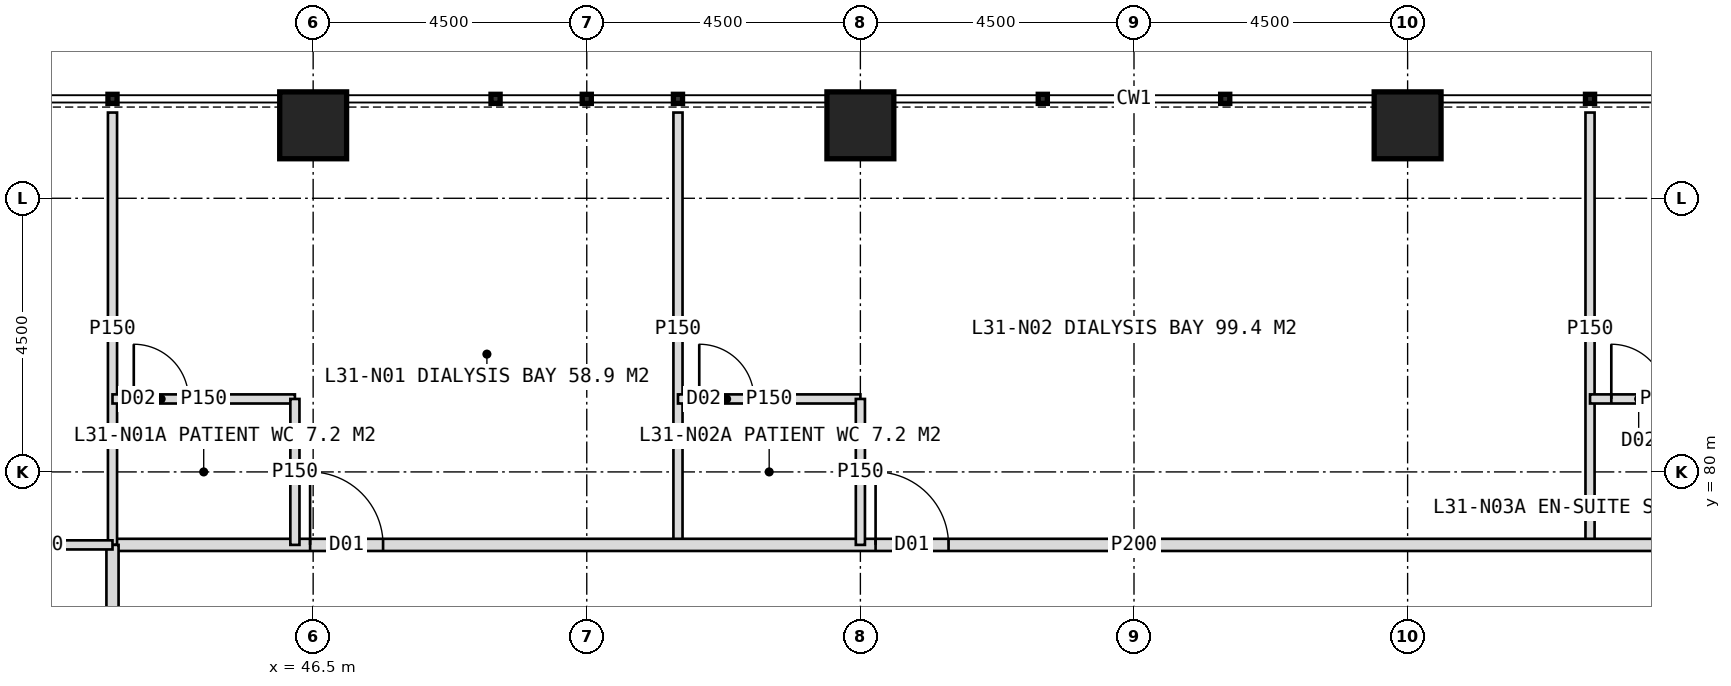
"""IFC4 building model, lengths in metres.
Left out: names, types, materials, properties, quantities, classifications, styles, units other than length and angle.
Written with IfcOpenShell. Run it as: python <this file> out.ifc"""

import sys

from ifc_helpers import new_model, si_unit, direction, frame, frame_2d, origin, origin_2d, place, context, subcontext, project, spatial, rectangle, hollow_rectangle, extrude, element, fill, save


model = new_model("IFC4")
c1 = context("Model", 3, precision=1e-05, world=origin(), true_north=direction((0.0, 1.0)))
c2 = subcontext(c1, "Body", "Model", "MODEL_VIEW")
j1 = project(units=[si_unit("LENGTHUNIT", "METRE"), si_unit("PLANEANGLEUNIT", "RADIAN")], contexts=[c1])
p1 = place(None, origin())
s1 = spatial("IfcSite", under=j1, at=p1, CompositionType="ELEMENT")
p2 = place(p1, origin())
s2 = spatial("IfcBuilding", under=s1, at=p2, CompositionType="ELEMENT")
p3 = place(p2, frame((0.0, 0.0, 132.0)))
s3 = spatial("IfcBuildingStorey", under=s2, at=p3, CompositionType="ELEMENT", Elevation=132.0)
for number, where, z_axis, x_axis in (
    (1, (46.5, 85.7, 0.0), (0.0, 0.0, 1.0), (1.0, 0.0, 0.0)),
    (2, (55.5, 85.7, 0.0), (0.0, 0.0, 1.0), (1.0, 0.0, 0.0)),
    (3, (64.5, 85.7, 0.0), (0.0, 0.0, 1.0), (1.0, 0.0, 0.0)),
):
    element("IfcColumn", number, at=place(p3, frame(where, z_axis=z_axis, x_axis=x_axis)), inside=s3, PredefinedType="COLUMN", context=c2, shape_type="SweptSolid", body=[
        extrude(hollow_rectangle(XDim=1.1, YDim=1.1, WallThickness=0.1, at=origin_2d()), origin(), (0.0, 0.0, 1.0), 4.0),
    ])
for number, where, z_axis, x_axis in (
    (4, (52.5, 78.8, 0.0), (0.0, 0.0, 1.0), (0.0, 1.0, 0.0)),
    (5, (67.5, 78.8, 0.0), (0.0, 0.0, 1.0), (0.0, 1.0, 0.0)),
):
    element("IfcWall", number, at=place(p3, frame(where, z_axis=z_axis, x_axis=x_axis)), inside=s3, PredefinedType="PARTITIONING", context=c2, shape_type="SweptSolid", body=[
        extrude(rectangle(XDim=7.11, YDim=0.15, at=frame_2d((3.555, 0.0))), origin(), (0.0, 0.0, 1.0), 3.75),
    ])
p4 = place(p3, frame((43.2, 78.8, 0.0), z_axis=(0.0, 0.0, 1.0), x_axis=(1.0, 0.0, 0.0)))
e6 = element("IfcWall", 6, at=p4, inside=s3, PredefinedType="PARTITIONING", context=c2, shape_type="SweptSolid", body=[
    extrude(rectangle(XDim=33.6, YDim=0.2, at=frame_2d((16.8, 0.0))), origin(), (0.0, 0.0, 1.0), 3.75),
])
p5 = place(p4, frame((3.25, 0.0, 0.0)))
e7 = element("IfcOpeningElement", 7, at=p5, cuts=e6, PredefinedType="OPENING", context=c2, shape_type="SweptSolid", body=[
    extrude(rectangle(XDim=1.2, YDim=2.2, at=frame_2d((0.6, 1.1))), frame((0.0, 0.11, 0.0), z_axis=(0.0, -1.0, 0.0), x_axis=(1.0, 0.0, 0.0)), (0.0, 0.0, 1.0), 0.22),
])
p6 = place(p4, frame((12.55, 0.0, 0.0)))
e8 = element("IfcOpeningElement", 8, at=p6, cuts=e6, PredefinedType="OPENING", context=c2, shape_type="SweptSolid", body=[
    extrude(rectangle(XDim=1.2, YDim=2.2, at=frame_2d((0.6, 1.1))), frame((0.0, 0.11, 0.0), z_axis=(0.0, -1.0, 0.0), x_axis=(1.0, 0.0, 0.0)), (0.0, 0.0, 1.0), 0.22),
])
p7 = place(p4, frame((26.95, 0.0, 0.0)))
e9 = element("IfcOpeningElement", 9, at=p7, cuts=e6, PredefinedType="OPENING", context=c2, shape_type="SweptSolid", body=[
    extrude(rectangle(XDim=1.2, YDim=2.2, at=frame_2d((0.6, 1.1))), frame((0.0, 0.11, 0.0), z_axis=(0.0, -1.0, 0.0), x_axis=(1.0, 0.0, 0.0)), (0.0, 0.0, 1.0), 0.22),
])
p8 = place(p3, frame((43.2, 78.8, 0.0), z_axis=(0.0, 0.0, 1.0), x_axis=(0.0, 1.0, 0.0)))
e10 = element("IfcWall", 10, at=p8, inside=s3, PredefinedType="PARTITIONING", context=c2, shape_type="SweptSolid", body=[
    extrude(rectangle(XDim=7.11, YDim=0.15, at=frame_2d((3.555, 0.0))), origin(), (0.0, 0.0, 1.0), 3.75),
])
p9 = place(p3, frame((43.2, 81.2, 0.0), z_axis=(0.0, 0.0, 1.0), x_axis=(1.0, 0.0, 0.0)))
e11 = element("IfcWall", 11, at=p9, inside=s3, PredefinedType="PARTITIONING", context=c2, shape_type="SweptSolid", body=[
    extrude(rectangle(XDim=3.0, YDim=0.15, at=frame_2d((1.5, 0.0))), origin(), (0.0, 0.0, 1.0), 2.997),
])
p10 = place(p9, frame((0.35, 0.0, 0.0)))
e12 = element("IfcOpeningElement", 12, at=p10, cuts=e11, PredefinedType="OPENING", context=c2, shape_type="SweptSolid", body=[
    extrude(rectangle(XDim=0.9, YDim=2.1, at=frame_2d((0.45, 1.05))), frame((0.0, 0.085, 0.0), z_axis=(0.0, -1.0, 0.0), x_axis=(1.0, 0.0, 0.0)), (0.0, 0.0, 1.0), 0.17),
])
p11 = place(p3, frame((46.2, 78.8, 0.0), z_axis=(0.0, 0.0, 1.0), x_axis=(0.0, 1.0, 0.0)))
e13 = element("IfcWall", 13, at=p11, inside=s3, PredefinedType="PARTITIONING", context=c2, shape_type="SweptSolid", body=[
    extrude(rectangle(XDim=2.4, YDim=0.15, at=frame_2d((1.2, 0.0))), origin(), (0.0, 0.0, 1.0), 3.75),
])
p12 = place(p3, frame((52.5, 81.2, 0.0), z_axis=(0.0, 0.0, 1.0), x_axis=(1.0, 0.0, 0.0)))
e14 = element("IfcWall", 14, at=p12, inside=s3, PredefinedType="PARTITIONING", context=c2, shape_type="SweptSolid", body=[
    extrude(rectangle(XDim=3.0, YDim=0.15, at=frame_2d((1.5, 0.0))), origin(), (0.0, 0.0, 1.0), 3.75),
])
p13 = place(p12, frame((0.35, 0.0, 0.0)))
e15 = element("IfcOpeningElement", 15, at=p13, cuts=e14, PredefinedType="OPENING", context=c2, shape_type="SweptSolid", body=[
    extrude(rectangle(XDim=0.9, YDim=2.1, at=frame_2d((0.45, 1.05))), frame((0.0, 0.085, 0.0), z_axis=(0.0, -1.0, 0.0), x_axis=(1.0, 0.0, 0.0)), (0.0, 0.0, 1.0), 0.17),
])
p14 = place(p3, frame((55.5, 78.8, 0.0), z_axis=(0.0, 0.0, 1.0), x_axis=(0.0, 1.0, 0.0)))
e16 = element("IfcWall", 16, at=p14, inside=s3, PredefinedType="PARTITIONING", context=c2, shape_type="SweptSolid", body=[
    extrude(rectangle(XDim=2.4, YDim=0.15, at=frame_2d((1.2, 0.0))), origin(), (0.0, 0.0, 1.0), 2.95),
])
p15 = place(p3, frame((67.5, 81.2, 0.0), z_axis=(0.0, 0.0, 1.0), x_axis=(1.0, 0.0, 0.0)))
e17 = element("IfcWall", 17, at=p15, inside=s3, PredefinedType="PARTITIONING", context=c2, shape_type="SweptSolid", body=[
    extrude(rectangle(XDim=2.4, YDim=0.15, at=frame_2d((1.2, 0.0))), origin(), (0.0, 0.0, 1.0), 3.75),
])
p16 = place(p15, frame((0.35, 0.0, 0.0)))
e18 = element("IfcOpeningElement", 18, at=p16, cuts=e17, PredefinedType="OPENING", context=c2, shape_type="SweptSolid", body=[
    extrude(rectangle(XDim=0.9, YDim=2.1, at=frame_2d((0.45, 1.05))), frame((0.0, 0.085, 0.0), z_axis=(0.0, -1.0, 0.0), x_axis=(1.0, 0.0, 0.0)), (0.0, 0.0, 1.0), 0.17),
])
p17 = place(p3, frame((43.2, 45.2, 0.0), z_axis=(0.0, 0.0, 1.0), x_axis=(0.0, 1.0, 0.0)))
e19 = element("IfcWall", 19, at=p17, inside=s3, PredefinedType="PARTITIONING", context=c2, shape_type="SweptSolid", body=[
    extrude(rectangle(XDim=33.6, YDim=0.2, at=frame_2d((16.8, 0.0))), origin(), (0.0, 0.0, 1.0), 3.75),
])
p18 = place(p17, frame((2.65, 0.0, 0.0)))
e20 = element("IfcOpeningElement", 20, at=p18, cuts=e19, PredefinedType="OPENING", context=c2, shape_type="SweptSolid", body=[
    extrude(rectangle(XDim=1.2, YDim=2.2, at=frame_2d((0.6, 1.1))), frame((0.0, 0.11, 0.0), z_axis=(0.0, -1.0, 0.0), x_axis=(1.0, 0.0, 0.0)), (0.0, 0.0, 1.0), 0.22),
])
p19 = place(p17, frame((8.95, 0.0, 0.0)))
e21 = element("IfcOpeningElement", 21, at=p19, cuts=e19, PredefinedType="OPENING", context=c2, shape_type="SweptSolid", body=[
    extrude(rectangle(XDim=1.2, YDim=2.2, at=frame_2d((0.6, 1.1))), frame((0.0, 0.11, 0.0), z_axis=(0.0, -1.0, 0.0), x_axis=(1.0, 0.0, 0.0)), (0.0, 0.0, 1.0), 0.22),
])
p20 = place(p17, frame((19.45, 0.0, 0.0)))
e22 = element("IfcOpeningElement", 22, at=p20, cuts=e19, PredefinedType="OPENING", context=c2, shape_type="SweptSolid", body=[
    extrude(rectangle(XDim=1.2, YDim=2.2, at=frame_2d((0.6, 1.1))), frame((0.0, 0.11, 0.0), z_axis=(0.0, -1.0, 0.0), x_axis=(1.0, 0.0, 0.0)), (0.0, 0.0, 1.0), 0.22),
])
p21 = place(p17, frame((28.45, 0.0, 0.0)))
e23 = element("IfcOpeningElement", 23, at=p21, cuts=e19, PredefinedType="OPENING", context=c2, shape_type="SweptSolid", body=[
    extrude(rectangle(XDim=1.2, YDim=2.2, at=frame_2d((0.6, 1.1))), frame((0.0, 0.11, 0.0), z_axis=(0.0, -1.0, 0.0), x_axis=(1.0, 0.0, 0.0)), (0.0, 0.0, 1.0), 0.22),
])
p22 = place(p3, frame((43.2, 78.8, 0.0), z_axis=(0.0, 0.0, 1.0), x_axis=(-1.0, 0.0, 0.0)))
e24 = element("IfcWall", 24, at=p22, inside=s3, PredefinedType="PARTITIONING", context=c2, shape_type="SweptSolid", body=[
    extrude(rectangle(XDim=2.4, YDim=0.15, at=frame_2d((1.2, 0.0))), origin(), (0.0, 0.0, 1.0), 3.75),
])
p23 = place(p5, origin())
e25 = element("IfcDoor", 25, at=p23, inside=s3, OperationType="SINGLE_SWING_LEFT", PredefinedType="DOOR", context=c2, shape_type="SweptSolid", body=[
    extrude(rectangle(XDim=1.2, YDim=2.2, at=frame_2d((0.6, 1.1))), frame((0.0, 0.025, 0.0), z_axis=(0.0, -1.0, 0.0), x_axis=(1.0, 0.0, 0.0)), (0.0, 0.0, 1.0), 0.05),
])
fill(e7, e25)
p24 = place(p10, origin())
e26 = element("IfcDoor", 26, at=p24, inside=s3, OperationType="SINGLE_SWING_LEFT", PredefinedType="DOOR", context=c2, shape_type="SweptSolid", body=[
    extrude(rectangle(XDim=0.9, YDim=2.1, at=frame_2d((0.45, 1.05))), frame((0.0, 0.025, 0.0), z_axis=(0.0, -1.0, 0.0), x_axis=(1.0, 0.0, 0.0)), (0.0, 0.0, 1.0), 0.05),
])
fill(e12, e26)
p25 = place(p6, origin())
e27 = element("IfcDoor", 27, at=p25, inside=s3, OperationType="SINGLE_SWING_LEFT", PredefinedType="DOOR", context=c2, shape_type="SweptSolid", body=[
    extrude(rectangle(XDim=1.2, YDim=2.2, at=frame_2d((0.6, 1.1))), frame((0.0, 0.025, 0.0), z_axis=(0.0, -1.0, 0.0), x_axis=(1.0, 0.0, 0.0)), (0.0, 0.0, 1.0), 0.05),
])
fill(e8, e27)
p26 = place(p13, origin())
e28 = element("IfcDoor", 28, at=p26, inside=s3, OperationType="SINGLE_SWING_LEFT", PredefinedType="DOOR", context=c2, shape_type="SweptSolid", body=[
    extrude(rectangle(XDim=0.9, YDim=2.1, at=frame_2d((0.45, 1.05))), frame((0.0, 0.025, 0.0), z_axis=(0.0, -1.0, 0.0), x_axis=(1.0, 0.0, 0.0)), (0.0, 0.0, 1.0), 0.05),
])
fill(e15, e28)
p27 = place(p16, origin())
e29 = element("IfcDoor", 29, at=p27, inside=s3, OperationType="SINGLE_SWING_LEFT", PredefinedType="DOOR", context=c2, shape_type="SweptSolid", body=[
    extrude(rectangle(XDim=0.9, YDim=2.1, at=frame_2d((0.45, 1.05))), frame((0.0, 0.025, 0.0), z_axis=(0.0, -1.0, 0.0), x_axis=(1.0, 0.0, 0.0)), (0.0, 0.0, 1.0), 0.05),
])
fill(e18, e29)
save(model, sys.argv[1])
